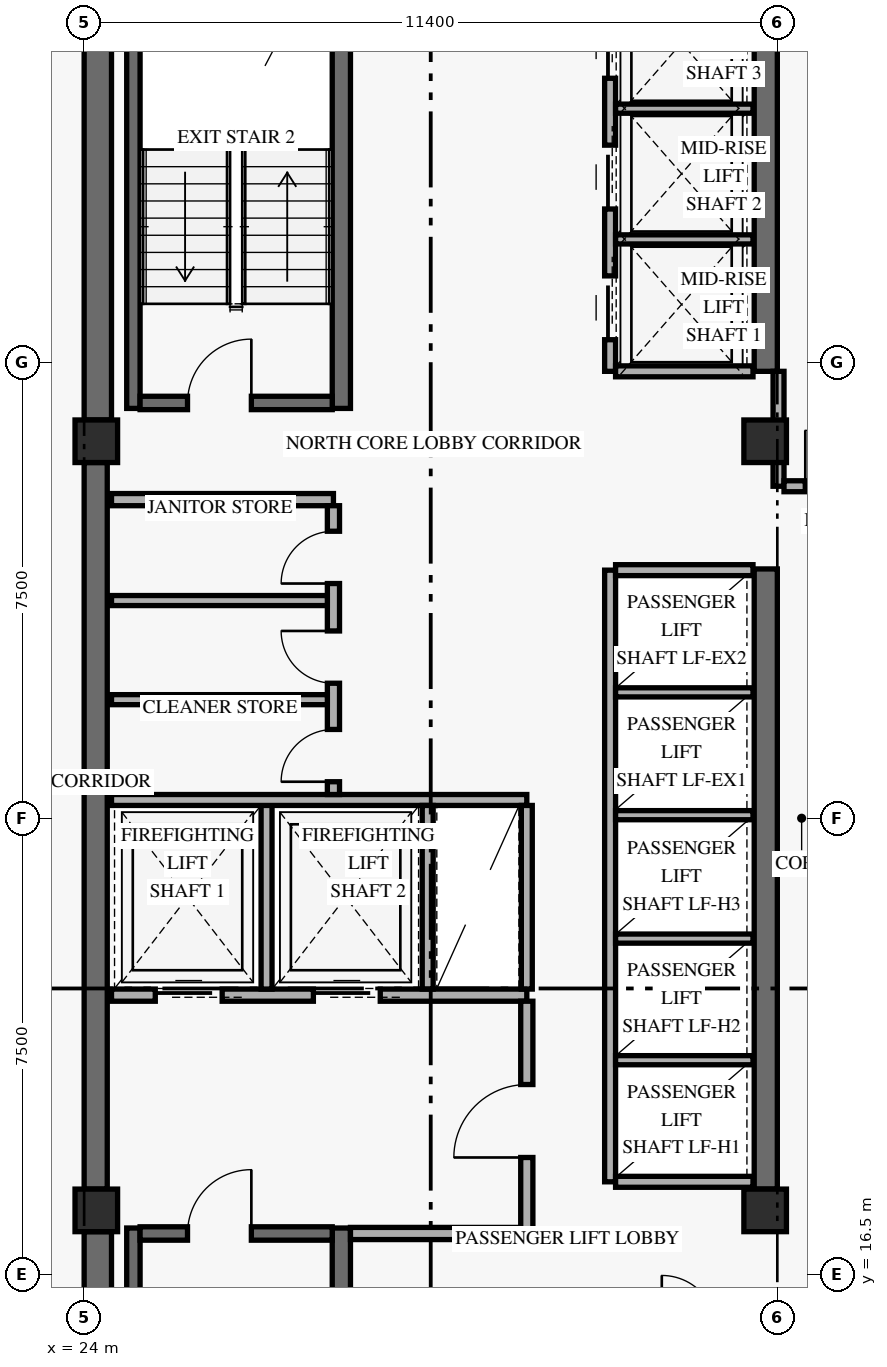
"""IFC4 building model, lengths in metres.
Left out: names, types, materials, properties, quantities, classifications, styles, units other than length and angle.
Written with IfcOpenShell. Run it as: python <this file> out.ifc"""

import sys

from ifc_helpers import new_model, si_unit, direction, frame, frame_2d, origin, origin_2d, place, context, subcontext, project, spatial, rectangle, extrude, element, fill, save


model = new_model("IFC4")
c1 = context("Model", 3, precision=1e-05, world=origin(), true_north=direction((0.0, 1.0)))
c2 = subcontext(c1, "Body", "Model", "MODEL_VIEW")
j1 = project(units=[si_unit("LENGTHUNIT", "METRE"), si_unit("PLANEANGLEUNIT", "RADIAN")], contexts=[c1])
p1 = place(None, origin())
s1 = spatial("IfcSite", under=j1, at=p1, CompositionType="ELEMENT")
p2 = place(p1, origin())
s2 = spatial("IfcBuilding", under=s1, at=p2, CompositionType="ELEMENT")
p3 = place(p2, frame((0.0, 0.0, 162.6)))
s3 = spatial("IfcBuildingStorey", under=s2, at=p3, CompositionType="ELEMENT", Elevation=162.6)
p4 = place(p3, frame((24.225, 9.6, 0.0), z_axis=(0.0, 0.0, 1.0), x_axis=(0.0, 1.0, 0.0)))
e1 = element("IfcWall", 1, at=p4, inside=s3, PredefinedType="SHEAR", context=c2, shape_type="SweptSolid", body=[
    extrude(rectangle(XDim=7.6, YDim=0.45, at=frame_2d((3.8, 0.0))), origin(), (0.0, 0.0, 1.0), 2.748),
])
p5 = place(p3, frame((24.19, 17.9, 0.0), z_axis=(0.0, 0.0, 1.0), x_axis=(0.0, 1.0, 0.0)))
e2 = element("IfcWall", 2, at=p5, inside=s3, PredefinedType="SHEAR", context=c2, shape_type="SweptSolid", body=[
    extrude(rectangle(XDim=11.95, YDim=0.38, at=frame_2d((5.975, 0.0))), origin(), (0.0, 0.0, 1.0), 2.748),
])
p6 = place(p3, frame((24.225, 30.55, 0.0), z_axis=(0.0, 0.0, 1.0), x_axis=(0.0, 1.0, 0.0)))
e3 = element("IfcWall", 3, at=p6, inside=s3, PredefinedType="SHEAR", context=c2, shape_type="SweptSolid", body=[
    extrude(rectangle(XDim=7.85, YDim=0.45, at=frame_2d((3.925, 0.0))), origin(), (0.0, 0.0, 1.0), 2.748),
])
p7 = place(p3, frame((35.21, 17.9, 0.0), z_axis=(0.0, 0.0, 1.0), x_axis=(0.0, 1.0, 0.0)))
e4 = element("IfcWall", 4, at=p7, inside=s3, PredefinedType="SHEAR", context=c2, shape_type="SweptSolid", body=[
    extrude(rectangle(XDim=10.2, YDim=0.38, at=frame_2d((5.1, 0.0))), origin(), (0.0, 0.0, 1.0), 2.748),
])
p8 = place(p3, frame((35.21, 31.35, 0.0), z_axis=(0.0, 0.0, 1.0), x_axis=(0.0, 1.0, 0.0)))
e5 = element("IfcWall", 5, at=p8, inside=s3, PredefinedType="SHEAR", context=c2, shape_type="SweptSolid", body=[
    extrude(rectangle(XDim=7.05, YDim=0.38, at=frame_2d((3.525, 0.0))), origin(), (0.0, 0.0, 1.0), 2.748),
])
p9 = place(p3, frame((24.81, 9.5, 0.0), z_axis=(0.0, 0.0, 1.0), x_axis=(0.0, 1.0, 0.0)))
e6 = element("IfcWall", 6, at=p9, inside=s3, PredefinedType="SHEAR", context=c2, shape_type="SweptSolid", body=[
    extrude(rectangle(XDim=7.76, YDim=0.22, at=frame_2d((3.88, 0.0))), origin(), (0.0, 0.0, 1.0), 3.36),
])
p10 = place(p3, frame((28.23, 9.5, 0.0), z_axis=(0.0, 0.0, 1.0), x_axis=(0.0, 1.0, 0.0)))
e7 = element("IfcWall", 7, at=p10, inside=s3, PredefinedType="SHEAR", context=c2, shape_type="SweptSolid", body=[
    extrude(rectangle(XDim=7.76, YDim=0.3, at=frame_2d((3.88, 0.0))), origin(), (0.0, 0.0, 1.0), 3.36),
])
p11 = place(p3, frame((24.92, 17.17, 0.0), z_axis=(0.0, 0.0, 1.0), x_axis=(1.0, 0.0, 0.0)))
e8 = element("IfcWall", 8, at=p11, inside=s3, PredefinedType="SHEAR", context=c2, shape_type="SweptSolid", body=[
    extrude(rectangle(XDim=3.16, YDim=0.22, at=frame_2d((1.58, 0.0))), origin(), (0.0, 0.0, 1.0), 3.36),
])
p12 = place(p11, frame((0.78, 0.0, 0.0)))
e9 = element("IfcOpeningElement", 9, at=p12, cuts=e8, PredefinedType="OPENING", context=c2, shape_type="SweptSolid", body=[
    extrude(rectangle(XDim=1.05, YDim=2.15, at=frame_2d((0.525, 1.075))), frame((0.0, 0.12, 0.0), z_axis=(0.0, -1.0, 0.0), x_axis=(1.0, 0.0, 0.0)), (0.0, 0.0, 1.0), 0.24),
])
p13 = place(p3, frame((24.81, 30.74, 0.0), z_axis=(0.0, 0.0, 1.0), x_axis=(0.0, 1.0, 0.0)))
e10 = element("IfcWall", 10, at=p13, inside=s3, PredefinedType="SHEAR", context=c2, shape_type="SweptSolid", body=[
    extrude(rectangle(XDim=7.76, YDim=0.22, at=frame_2d((3.88, 0.0))), origin(), (0.0, 0.0, 1.0), 3.36),
])
p14 = place(p3, frame((28.23, 30.74, 0.0), z_axis=(0.0, 0.0, 1.0), x_axis=(0.0, 1.0, 0.0)))
e11 = element("IfcWall", 11, at=p14, inside=s3, PredefinedType="SHEAR", context=c2, shape_type="SweptSolid", body=[
    extrude(rectangle(XDim=7.76, YDim=0.3, at=frame_2d((3.88, 0.0))), origin(), (0.0, 0.0, 1.0), 3.36),
])
p15 = place(p3, frame((24.92, 30.83, 0.0), z_axis=(0.0, 0.0, 1.0), x_axis=(1.0, 0.0, 0.0)))
e12 = element("IfcWall", 12, at=p15, inside=s3, PredefinedType="SHEAR", context=c2, shape_type="SweptSolid", body=[
    extrude(rectangle(XDim=3.16, YDim=0.22, at=frame_2d((1.58, 0.0))), origin(), (0.0, 0.0, 1.0), 3.36),
])
p16 = place(p15, frame((0.78, 0.0, 0.0)))
e13 = element("IfcOpeningElement", 13, at=p16, cuts=e12, PredefinedType="OPENING", context=c2, shape_type="SweptSolid", body=[
    extrude(rectangle(XDim=1.05, YDim=2.15, at=frame_2d((0.525, 1.075))), frame((0.0, 0.12, 0.0), z_axis=(0.0, -1.0, 0.0), x_axis=(1.0, 0.0, 0.0)), (0.0, 0.0, 1.0), 0.24),
])
for number, where, z_axis, x_axis in (
    (14, (24.2, 17.55, 0.0), (0.0, 0.0, 1.0), (1.0, 0.0, 0.0)),
    (15, (24.2, 30.2, 0.0), (0.0, 0.0, 1.0), (1.0, 0.0, 0.0)),
    (16, (35.2, 17.55, 0.0), (0.0, 0.0, 1.0), (1.0, 0.0, 0.0)),
    (17, (35.2, 30.2, 0.0), (0.0, 0.0, 1.0), (1.0, 0.0, 0.0)),
):
    element("IfcColumn", number, at=place(p3, frame(where, z_axis=z_axis, x_axis=x_axis)), inside=s3, PredefinedType="COLUMN", context=c2, shape_type="SweptSolid", body=[
        extrude(rectangle(XDim=0.7, YDim=0.7, at=origin_2d()), origin(), (0.0, 0.0, 1.0), 3.6),
    ])
p17 = place(p3, frame((24.45, 21.09, 0.0), z_axis=(0.0, 0.0, 1.0), x_axis=(1.0, 0.0, 0.0)))
e18 = element("IfcWall", 18, at=p17, inside=s3, PredefinedType="STANDARD", context=c2, shape_type="SweptSolid", body=[
    extrude(rectangle(XDim=6.83, YDim=0.2, at=frame_2d((3.415, 0.0))), origin(), (0.0, 0.0, 1.0), 3.36),
])
p18 = place(p17, frame((0.72, 0.0, 0.0)))
e19 = element("IfcOpeningElement", 19, at=p18, cuts=e18, PredefinedType="OPENING", context=c2, shape_type="SweptSolid", body=[
    extrude(rectangle(XDim=1.1, YDim=2.2, at=frame_2d((0.55, 1.1))), frame((0.0, 0.11, 0.0), z_axis=(0.0, -1.0, 0.0), x_axis=(1.0, 0.0, 0.0)), (0.0, 0.0, 1.0), 0.22),
])
p19 = place(p17, frame((3.32, 0.0, 0.0)))
e20 = element("IfcOpeningElement", 20, at=p19, cuts=e18, PredefinedType="OPENING", context=c2, shape_type="SweptSolid", body=[
    extrude(rectangle(XDim=1.1, YDim=2.2, at=frame_2d((0.55, 1.1))), frame((0.0, 0.11, 0.0), z_axis=(0.0, -1.0, 0.0), x_axis=(1.0, 0.0, 0.0)), (0.0, 0.0, 1.0), 0.22),
])
p20 = place(p3, frame((28.38, 17.17, 0.0), z_axis=(0.0, 0.0, 1.0), x_axis=(1.0, 0.0, 0.0)))
e21 = element("IfcWall", 21, at=p20, inside=s3, PredefinedType="STANDARD", context=c2, shape_type="SweptSolid", body=[
    extrude(rectangle(XDim=2.9, YDim=0.2, at=frame_2d((1.45, 0.0))), origin(), (0.0, 0.0, 1.0), 3.36),
])
p21 = place(p3, frame((31.28, 17.07, 0.0), z_axis=(0.0, 0.0, 1.0), x_axis=(0.0, 1.0, 0.0)))
e22 = element("IfcWall", 22, at=p21, inside=s3, PredefinedType="STANDARD", context=c2, shape_type="SweptSolid", body=[
    extrude(rectangle(XDim=3.92, YDim=0.2, at=frame_2d((1.96, 0.0))), origin(), (0.0, 0.0, 1.0), 2.73),
])
p22 = place(p21, frame((1.35, 0.0, 0.0)))
e23 = element("IfcOpeningElement", 23, at=p22, cuts=e22, PredefinedType="OPENING", context=c2, shape_type="SweptSolid", body=[
    extrude(rectangle(XDim=1.2, YDim=2.15, at=frame_2d((0.6, 1.075))), frame((0.0, 0.11, 0.0), z_axis=(0.0, -1.0, 0.0), x_axis=(1.0, 0.0, 0.0)), (0.0, 0.0, 1.0), 0.22),
])
p23 = place(p3, frame((27.0, 21.19, 0.0), z_axis=(0.0, 0.0, 1.0), x_axis=(0.0, 1.0, 0.0)))
e24 = element("IfcWall", 24, at=p23, inside=s3, PredefinedType="STANDARD", context=c2, shape_type="SweptSolid", body=[
    extrude(rectangle(XDim=3.11, YDim=0.18, at=frame_2d((1.555, 0.0))), origin(), (0.0, 0.0, 1.0), 3.36),
])
p24 = place(p3, frame((24.45, 24.3, 0.0), z_axis=(0.0, 0.0, 1.0), x_axis=(1.0, 0.0, 0.0)))
e25 = element("IfcWall", 25, at=p24, inside=s3, PredefinedType="STANDARD", context=c2, shape_type="SweptSolid", body=[
    extrude(rectangle(XDim=6.83, YDim=0.18, at=frame_2d((3.415, 0.0))), origin(), (0.0, 0.0, 1.0), 3.36),
])
for number, where, z_axis, x_axis in (
    (26, (29.65, 21.19, 0.0), (0.0, 0.0, 1.0), (0.0, 1.0, 0.0)),
    (27, (31.28, 21.19, 0.0), (0.0, 0.0, 1.0), (0.0, 1.0, 0.0)),
):
    element("IfcWall", number, at=place(p3, frame(where, z_axis=z_axis, x_axis=x_axis)), inside=s3, PredefinedType="STANDARD", context=c2, shape_type="SweptSolid", body=[
        extrude(rectangle(XDim=3.02, YDim=0.18, at=frame_2d((1.51, 0.0))), origin(), (0.0, 0.0, 1.0), 3.36),
    ])
p25 = place(p3, frame((24.45, 29.24, 0.0), z_axis=(0.0, 0.0, 1.0), x_axis=(1.0, 0.0, 0.0)))
e28 = element("IfcWall", 28, at=p25, inside=s3, PredefinedType="STANDARD", context=c2, shape_type="SweptSolid", body=[
    extrude(rectangle(XDim=3.65, YDim=0.2, at=frame_2d((1.825, 0.0))), origin(), (0.0, 0.0, 1.0), 3.36),
])
p26 = place(p3, frame((28.1, 24.39, 0.0), z_axis=(0.0, 0.0, 1.0), x_axis=(0.0, 1.0, 0.0)))
e29 = element("IfcWall", 29, at=p26, inside=s3, PredefinedType="STANDARD", context=c2, shape_type="SweptSolid", body=[
    extrude(rectangle(XDim=4.75, YDim=0.2, at=frame_2d((2.375, 0.0))), origin(), (0.0, 0.0, 1.0), 3.36),
])
p27 = place(p26, frame((0.21, 0.0, 0.0)))
e30 = element("IfcOpeningElement", 30, at=p27, cuts=e29, PredefinedType="OPENING", context=c2, shape_type="SweptSolid", body=[
    extrude(rectangle(XDim=0.86, YDim=2.1, at=frame_2d((0.43, 1.05))), frame((0.0, 0.11, 0.0), z_axis=(0.0, -1.0, 0.0), x_axis=(1.0, 0.0, 0.0)), (0.0, 0.0, 1.0), 0.22),
])
p28 = place(p26, frame((1.83, 0.0, 0.0)))
e31 = element("IfcOpeningElement", 31, at=p28, cuts=e29, PredefinedType="OPENING", context=c2, shape_type="SweptSolid", body=[
    extrude(rectangle(XDim=0.86, YDim=2.1, at=frame_2d((0.43, 1.05))), frame((0.0, 0.11, 0.0), z_axis=(0.0, -1.0, 0.0), x_axis=(1.0, 0.0, 0.0)), (0.0, 0.0, 1.0), 0.22),
])
p29 = place(p26, frame((3.47, 0.0, 0.0)))
e32 = element("IfcOpeningElement", 32, at=p29, cuts=e29, PredefinedType="OPENING", context=c2, shape_type="SweptSolid", body=[
    extrude(rectangle(XDim=0.86, YDim=2.1, at=frame_2d((0.43, 1.05))), frame((0.0, 0.11, 0.0), z_axis=(0.0, -1.0, 0.0), x_axis=(1.0, 0.0, 0.0)), (0.0, 0.0, 1.0), 0.22),
])
for number, where, z_axis, x_axis in (
    (33, (24.45, 25.95, 0.0), (0.0, 0.0, 1.0), (1.0, 0.0, 0.0)),
    (34, (24.45, 27.58, 0.0), (0.0, 0.0, 1.0), (1.0, 0.0, 0.0)),
):
    element("IfcWall", number, at=place(p3, frame(where, z_axis=z_axis, x_axis=x_axis)), inside=s3, PredefinedType="PARTITIONING", context=c2, shape_type="SweptSolid", body=[
        extrude(rectangle(XDim=3.55, YDim=0.165, at=frame_2d((1.775, 0.0))), origin(), (0.0, 0.0, 1.0), 3.36),
    ])
p30 = place(p3, frame((32.65, 18.02, 0.0), z_axis=(0.0, 0.0, 1.0), x_axis=(0.0, 1.0, 0.0)))
e35 = element("IfcWall", 35, at=p30, inside=s3, PredefinedType="STANDARD", context=c2, shape_type="SweptSolid", body=[
    extrude(rectangle(XDim=10.06, YDim=0.18, at=frame_2d((5.03, 0.0))), origin(), (0.0, 0.0, 1.0), 3.36),
])
for number, where, z_axis, x_axis in (
    (36, (32.74, 18.02, 0.0), (0.0, 0.0, 1.0), (1.0, 0.0, 0.0)),
    (37, (32.74, 28.08, 0.0), (0.0, 0.0, 1.0), (1.0, 0.0, 0.0)),
):
    element("IfcWall", number, at=place(p3, frame(where, z_axis=z_axis, x_axis=x_axis)), inside=s3, PredefinedType="STANDARD", context=c2, shape_type="SweptSolid", body=[
        extrude(rectangle(XDim=2.26, YDim=0.18, at=frame_2d((1.13, 0.0))), origin(), (0.0, 0.0, 1.0), 3.36),
    ])
for number, where, z_axis, x_axis in (
    (38, (32.74, 20.02, 0.0), (0.0, 0.0, 1.0), (1.0, 0.0, 0.0)),
    (39, (32.74, 22.02, 0.0), (0.0, 0.0, 1.0), (1.0, 0.0, 0.0)),
    (40, (32.74, 24.05, 0.0), (0.0, 0.0, 1.0), (1.0, 0.0, 0.0)),
    (41, (32.74, 26.07, 0.0), (0.0, 0.0, 1.0), (1.0, 0.0, 0.0)),
):
    element("IfcWall", number, at=place(p3, frame(where, z_axis=z_axis, x_axis=x_axis)), inside=s3, PredefinedType="STANDARD", context=c2, shape_type="SweptSolid", body=[
        extrude(rectangle(XDim=2.26, YDim=0.15, at=frame_2d((1.13, 0.0))), origin(), (0.0, 0.0, 1.0), 3.36),
    ])
p31 = place(p3, frame((32.65, 31.35, 0.0), z_axis=(0.0, 0.0, 1.0), x_axis=(0.0, 1.0, 0.0)))
e42 = element("IfcWall", 42, at=p31, inside=s3, PredefinedType="STANDARD", context=c2, shape_type="SweptSolid", body=[
    extrude(rectangle(XDim=7.21, YDim=0.18, at=frame_2d((3.605, 0.0))), origin(), (0.0, 0.0, 1.0), 3.36),
])
p32 = place(p31, frame((0.52, 0.0, 0.0)))
e43 = element("IfcOpeningElement", 43, at=p32, cuts=e42, PredefinedType="OPENING", context=c2, shape_type="SweptSolid", body=[
    extrude(rectangle(XDim=1.05, YDim=2.2, at=frame_2d((0.525, 1.1))), frame((0.0, 0.1, 0.0), z_axis=(0.0, -1.0, 0.0), x_axis=(1.0, 0.0, 0.0)), (0.0, 0.0, 1.0), 0.2),
])
p33 = place(p31, frame((2.67, 0.0, 0.0)))
e44 = element("IfcOpeningElement", 44, at=p33, cuts=e42, PredefinedType="OPENING", context=c2, shape_type="SweptSolid", body=[
    extrude(rectangle(XDim=1.05, YDim=2.2, at=frame_2d((0.525, 1.1))), frame((0.0, 0.1, 0.0), z_axis=(0.0, -1.0, 0.0), x_axis=(1.0, 0.0, 0.0)), (0.0, 0.0, 1.0), 0.2),
])
p34 = place(p31, frame((4.82, 0.0, 0.0)))
e45 = element("IfcOpeningElement", 45, at=p34, cuts=e42, PredefinedType="OPENING", context=c2, shape_type="SweptSolid", body=[
    extrude(rectangle(XDim=1.05, YDim=2.2, at=frame_2d((0.525, 1.1))), frame((0.0, 0.1, 0.0), z_axis=(0.0, -1.0, 0.0), x_axis=(1.0, 0.0, 0.0)), (0.0, 0.0, 1.0), 0.2),
])
p35 = place(p3, frame((32.74, 31.35, 0.0), z_axis=(0.0, 0.0, 1.0), x_axis=(1.0, 0.0, 0.0)))
e46 = element("IfcWall", 46, at=p35, inside=s3, PredefinedType="STANDARD", context=c2, shape_type="SweptSolid", body=[
    extrude(rectangle(XDim=2.26, YDim=0.18, at=frame_2d((1.13, 0.0))), origin(), (0.0, 0.0, 1.0), 3.36),
])
for number, where, z_axis, x_axis in (
    (47, (32.74, 33.52, 0.0), (0.0, 0.0, 1.0), (1.0, 0.0, 0.0)),
    (48, (32.74, 35.67, 0.0), (0.0, 0.0, 1.0), (1.0, 0.0, 0.0)),
):
    element("IfcWall", number, at=place(p3, frame(where, z_axis=z_axis, x_axis=x_axis)), inside=s3, PredefinedType="STANDARD", context=c2, shape_type="SweptSolid", body=[
        extrude(rectangle(XDim=2.26, YDim=0.15, at=frame_2d((1.13, 0.0))), origin(), (0.0, 0.0, 1.0), 3.36),
    ])
p36 = place(p3, frame((35.42, 29.46, 0.0), z_axis=(0.0, 0.0, 1.0), x_axis=(0.0, 1.0, 0.0)))
e49 = element("IfcWall", 49, at=p36, inside=s3, PredefinedType="STANDARD", context=c2, shape_type="SweptSolid", body=[
    extrude(rectangle(XDim=1.89, YDim=0.18, at=frame_2d((0.945, 0.0))), origin(), (0.0, 0.0, 1.0), 2.73),
])
p37 = place(p3, frame((35.51, 29.46, 0.0), z_axis=(0.0, 0.0, 1.0), x_axis=(1.0, 0.0, 0.0)))
e50 = element("IfcWall", 50, at=p37, inside=s3, PredefinedType="STANDARD", context=c2, shape_type="SweptSolid", body=[
    extrude(rectangle(XDim=14.29, YDim=0.18, at=frame_2d((7.145, 0.0))), origin(), (0.0, 0.0, 1.0), 2.73),
])
p38 = place(p37, frame((0.35, 0.0, 0.0)))
e51 = element("IfcOpeningElement", 51, at=p38, cuts=e50, PredefinedType="OPENING", context=c2, shape_type="SweptSolid", body=[
    extrude(rectangle(XDim=0.92, YDim=2.15, at=frame_2d((0.46, 1.075))), frame((0.0, 0.1, 0.0), z_axis=(0.0, -1.0, 0.0), x_axis=(1.0, 0.0, 0.0)), (0.0, 0.0, 1.0), 0.2),
])
p39 = place(p37, frame((7.828, 0.0, 0.0)))
e52 = element("IfcOpeningElement", 52, at=p39, cuts=e50, PredefinedType="OPENING", context=c2, shape_type="SweptSolid", body=[
    extrude(rectangle(XDim=0.92, YDim=2.15, at=frame_2d((0.46, 1.075))), frame((0.0, 0.1, 0.0), z_axis=(0.0, -1.0, 0.0), x_axis=(1.0, 0.0, 0.0)), (0.0, 0.0, 1.0), 0.2),
])
p40 = place(p12, frame((1.05, 0.0, 0.0), z_axis=(0.0, 0.0, 1.0), x_axis=(-1.0, 0.0, 0.0)))
e53 = element("IfcDoor", 53, at=p40, inside=s3, OperationType="SINGLE_SWING_LEFT", PredefinedType="DOOR", context=c2, shape_type="SweptSolid", body=[
    extrude(rectangle(XDim=1.05, YDim=2.15, at=frame_2d((0.525, 1.075))), frame((0.0, 0.025, 0.0), z_axis=(0.0, -1.0, 0.0), x_axis=(1.0, 0.0, 0.0)), (0.0, 0.0, 1.0), 0.05),
])
fill(e9, e53)
p41 = place(p16, origin())
e54 = element("IfcDoor", 54, at=p41, inside=s3, OperationType="SINGLE_SWING_RIGHT", PredefinedType="DOOR", context=c2, shape_type="SweptSolid", body=[
    extrude(rectangle(XDim=1.05, YDim=2.15, at=frame_2d((0.525, 1.075))), frame((0.0, 0.025, 0.0), z_axis=(0.0, -1.0, 0.0), x_axis=(1.0, 0.0, 0.0)), (0.0, 0.0, 1.0), 0.05),
])
fill(e13, e54)
p42 = place(p18, origin())
e55 = element("IfcDoor", 55, at=p42, inside=s3, OperationType="SLIDING_TO_LEFT", PredefinedType="DOOR", context=c2, shape_type="SweptSolid", body=[
    extrude(rectangle(XDim=1.1, YDim=2.2, at=frame_2d((0.55, 1.1))), frame((0.0, 0.025, 0.0), z_axis=(0.0, -1.0, 0.0), x_axis=(1.0, 0.0, 0.0)), (0.0, 0.0, 1.0), 0.05),
])
fill(e19, e55)
p43 = place(p19, origin())
e56 = element("IfcDoor", 56, at=p43, inside=s3, OperationType="SLIDING_TO_LEFT", PredefinedType="DOOR", context=c2, shape_type="SweptSolid", body=[
    extrude(rectangle(XDim=1.1, YDim=2.2, at=frame_2d((0.55, 1.1))), frame((0.0, 0.025, 0.0), z_axis=(0.0, -1.0, 0.0), x_axis=(1.0, 0.0, 0.0)), (0.0, 0.0, 1.0), 0.05),
])
fill(e20, e56)
p44 = place(p22, origin())
e57 = element("IfcDoor", 57, at=p44, inside=s3, OperationType="SINGLE_SWING_LEFT", PredefinedType="DOOR", context=c2, shape_type="SweptSolid", body=[
    extrude(rectangle(XDim=1.2, YDim=2.15, at=frame_2d((0.6, 1.075))), frame((0.0, 0.025, 0.0), z_axis=(0.0, -1.0, 0.0), x_axis=(1.0, 0.0, 0.0)), (0.0, 0.0, 1.0), 0.05),
])
fill(e23, e57)
p45 = place(p27, origin())
e58 = element("IfcDoor", 58, at=p45, inside=s3, OperationType="SINGLE_SWING_LEFT", PredefinedType="DOOR", context=c2, shape_type="SweptSolid", body=[
    extrude(rectangle(XDim=0.86, YDim=2.1, at=frame_2d((0.43, 1.05))), frame((0.0, 0.025, 0.0), z_axis=(0.0, -1.0, 0.0), x_axis=(1.0, 0.0, 0.0)), (0.0, 0.0, 1.0), 0.05),
])
fill(e30, e58)
p46 = place(p28, origin())
e59 = element("IfcDoor", 59, at=p46, inside=s3, OperationType="SINGLE_SWING_RIGHT", PredefinedType="DOOR", context=c2, shape_type="SweptSolid", body=[
    extrude(rectangle(XDim=0.86, YDim=2.1, at=frame_2d((0.43, 1.05))), frame((0.0, 0.025, 0.0), z_axis=(0.0, -1.0, 0.0), x_axis=(1.0, 0.0, 0.0)), (0.0, 0.0, 1.0), 0.05),
])
fill(e31, e59)
p47 = place(p29, origin())
e60 = element("IfcDoor", 60, at=p47, inside=s3, OperationType="SINGLE_SWING_LEFT", PredefinedType="DOOR", context=c2, shape_type="SweptSolid", body=[
    extrude(rectangle(XDim=0.86, YDim=2.1, at=frame_2d((0.43, 1.05))), frame((0.0, 0.025, 0.0), z_axis=(0.0, -1.0, 0.0), x_axis=(1.0, 0.0, 0.0)), (0.0, 0.0, 1.0), 0.05),
])
fill(e32, e60)
p48 = place(p32, origin())
e61 = element("IfcDoor", 61, at=p48, inside=s3, OperationType="SLIDING_TO_LEFT", PredefinedType="DOOR", context=c2, shape_type="SweptSolid", body=[
    extrude(rectangle(XDim=1.05, YDim=2.2, at=frame_2d((0.525, 1.1))), frame((0.0, 0.025, 0.0), z_axis=(0.0, -1.0, 0.0), x_axis=(1.0, 0.0, 0.0)), (0.0, 0.0, 1.0), 0.05),
])
fill(e43, e61)
p49 = place(p33, origin())
e62 = element("IfcDoor", 62, at=p49, inside=s3, OperationType="SLIDING_TO_LEFT", PredefinedType="DOOR", context=c2, shape_type="SweptSolid", body=[
    extrude(rectangle(XDim=1.05, YDim=2.2, at=frame_2d((0.525, 1.1))), frame((0.0, 0.025, 0.0), z_axis=(0.0, -1.0, 0.0), x_axis=(1.0, 0.0, 0.0)), (0.0, 0.0, 1.0), 0.05),
])
fill(e44, e62)
p50 = place(p34, origin())
e63 = element("IfcDoor", 63, at=p50, inside=s3, OperationType="SLIDING_TO_LEFT", PredefinedType="DOOR", context=c2, shape_type="SweptSolid", body=[
    extrude(rectangle(XDim=1.05, YDim=2.2, at=frame_2d((0.525, 1.1))), frame((0.0, 0.025, 0.0), z_axis=(0.0, -1.0, 0.0), x_axis=(1.0, 0.0, 0.0)), (0.0, 0.0, 1.0), 0.05),
])
fill(e45, e63)
p51 = place(p38, origin())
e64 = element("IfcDoor", 64, at=p51, inside=s3, OperationType="SINGLE_SWING_LEFT", PredefinedType="DOOR", context=c2, shape_type="SweptSolid", body=[
    extrude(rectangle(XDim=0.92, YDim=2.15, at=frame_2d((0.46, 1.075))), frame((0.0, 0.025, 0.0), z_axis=(0.0, -1.0, 0.0), x_axis=(1.0, 0.0, 0.0)), (0.0, 0.0, 1.0), 0.05),
])
fill(e51, e64)
save(model, sys.argv[1])
